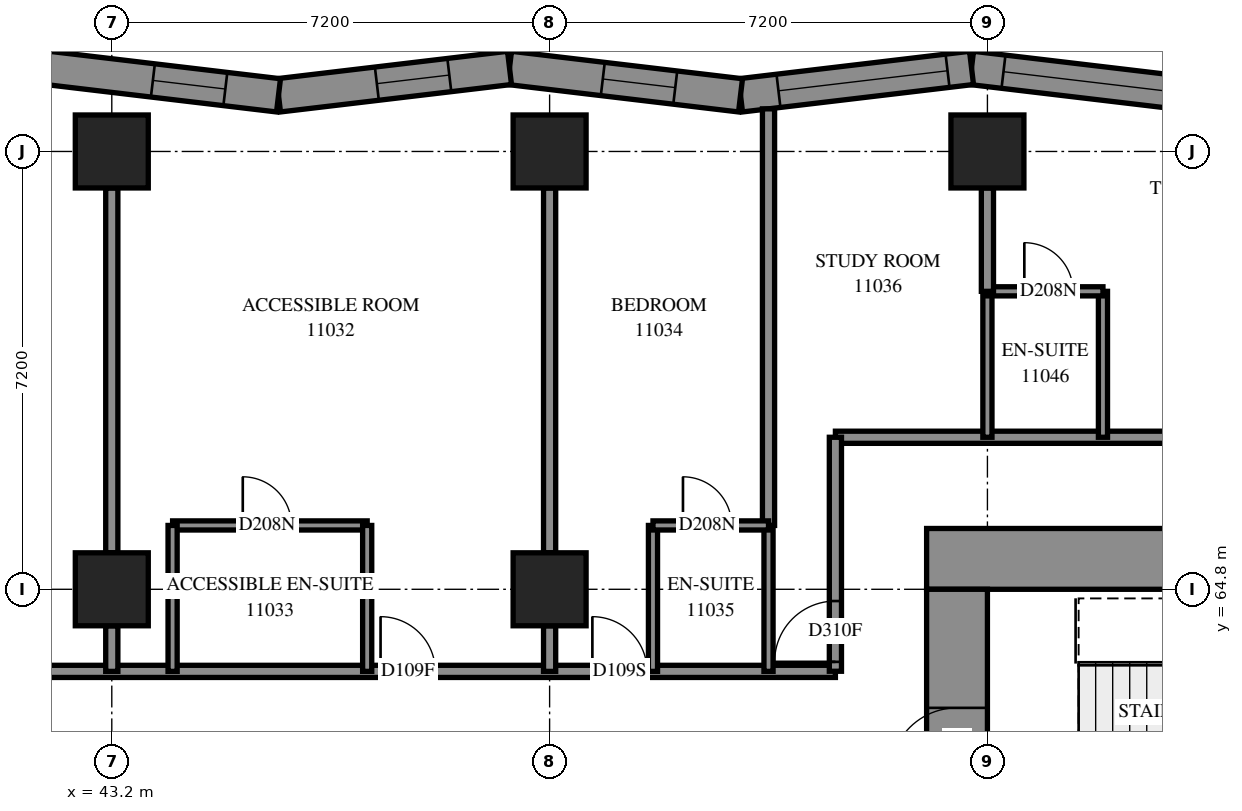
"""IFC4 building model, lengths in metres.
Left out: names, types, materials, properties, quantities, classifications, styles, units other than length and angle.
Written with IfcOpenShell. Run it as: python <this file> out.ifc"""

import sys

from ifc_helpers import new_model, si_unit, direction, frame, frame_2d, origin, origin_2d, place, context, subcontext, project, spatial, polyline, rectangle, outline, extrude, element, fill, save


model = new_model("IFC4")
c1 = context("Model", 3, precision=1e-05, world=origin(), true_north=direction((0.0, 1.0)))
c2 = subcontext(c1, "Body", "Model", "MODEL_VIEW")
j1 = project(units=[si_unit("LENGTHUNIT", "METRE"), si_unit("PLANEANGLEUNIT", "RADIAN")], contexts=[c1])
p1 = place(None, origin())
s1 = spatial("IfcSite", under=j1, at=p1, CompositionType="ELEMENT")
p2 = place(p1, origin())
s2 = spatial("IfcBuilding", under=s1, at=p2, CompositionType="ELEMENT")
p3 = place(p2, frame((0.0, 0.0, 44.0)))
s3 = spatial("IfcBuildingStorey", under=s2, at=p3, CompositionType="ELEMENT", Elevation=44.0)
for number, where, z_axis, x_axis in (
    (1, (43.2, 64.8, 0.0), (0.0, 0.0, 1.0), (1.0, 0.0, 0.0)),
    (2, (43.2, 72.0, 0.0), (0.0, 0.0, 1.0), (1.0, 0.0, 0.0)),
    (3, (50.4, 64.8, 0.0), (0.0, 0.0, 1.0), (1.0, 0.0, 0.0)),
    (4, (50.4, 72.0, 0.0), (0.0, 0.0, 1.0), (1.0, 0.0, 0.0)),
    (5, (57.6, 72.0, 0.0), (0.0, 0.0, 1.0), (1.0, 0.0, 0.0)),
):
    element("IfcColumn", number, at=place(p3, frame(where, z_axis=z_axis, x_axis=x_axis)), inside=s3, PredefinedType="COLUMN", context=c2, shape_type="SweptSolid", body=[
        extrude(rectangle(XDim=1.2, YDim=1.2, at=origin_2d()), origin(), (0.0, 0.0, 1.0), 3.1),
    ])
p4 = place(p3, frame((56.6, 65.3, -0.3), z_axis=(0.0, 0.0, 1.0), x_axis=(1.0, 0.0, 0.0)))
e6 = element("IfcWall", 6, at=p4, inside=s3, PredefinedType="SHEAR", context=c2, shape_type="SweptSolid", body=[
    extrude(rectangle(XDim=16.4, YDim=1.0, at=frame_2d((8.2, 0.0))), origin(), (0.0, 0.0, 1.0), 2.7),
])
p5 = place(p4, frame((11.0, 0.0, 0.3)))
e7 = element("IfcOpeningElement", 7, at=p5, cuts=e6, PredefinedType="OPENING", context=c2, shape_type="SweptSolid", body=[
    extrude(rectangle(XDim=0.8, YDim=2.1, at=frame_2d((0.4, 1.05))), frame((0.0, 0.51, 0.0), z_axis=(0.0, -1.0, 0.0), x_axis=(1.0, 0.0, 0.0)), (0.0, 0.0, 1.0), 1.02),
])
p6 = place(p3, frame((57.1, 50.4, -0.3), z_axis=(0.0, 0.0, 1.0), x_axis=(0.0, 1.0, 0.0)))
e8 = element("IfcWall", 8, at=p6, inside=s3, PredefinedType="SHEAR", context=c2, shape_type="SweptSolid", body=[
    extrude(rectangle(XDim=14.4, YDim=1.0, at=frame_2d((7.2, 0.0))), origin(), (0.0, 0.0, 1.0), 2.7),
])
p7 = place(p6, frame((4.55, 0.0, 0.3)))
e9 = element("IfcOpeningElement", 9, at=p7, cuts=e8, PredefinedType="OPENING", context=c2, shape_type="SweptSolid", body=[
    extrude(rectangle(XDim=1.1, YDim=2.1, at=frame_2d((0.55, 1.05))), frame((0.0, 0.51, 0.0), z_axis=(0.0, -1.0, 0.0), x_axis=(1.0, 0.0, 0.0)), (0.0, 0.0, 1.0), 1.02),
])
p8 = place(p6, frame((11.35, 0.0, 0.3)))
e10 = element("IfcOpeningElement", 10, at=p8, cuts=e8, PredefinedType="OPENING", context=c2, shape_type="SweptSolid", body=[
    extrude(rectangle(XDim=1.1, YDim=2.1, at=frame_2d((0.55, 1.05))), frame((0.0, 0.51, 0.0), z_axis=(0.0, -1.0, 0.0), x_axis=(1.0, 0.0, 0.0)), (0.0, 0.0, 1.0), 1.02),
])
p9 = place(p3, frame((61.138, 72.923, 0.0), z_axis=(0.0, 0.0, 1.0), x_axis=(-0.9930269402, 0.1178876415, 0.0)))
e11 = element("IfcWall", 11, at=p9, inside=s3, PredefinedType="SOLIDWALL", context=c2, shape_type="SweptSolid", body=[
    extrude(outline(polyline([(0.033, -0.275), (3.858, -0.275), (3.793, 0.275), (-0.033, 0.275), (0.033, -0.275)])), origin(), (0.0, 0.0, 1.0), 3.1),
])
p10 = place(p9, frame((0.496, 0.0, 0.5)))
e12 = element("IfcOpeningElement", 12, at=p10, cuts=e11, PredefinedType="OPENING", context=c2, shape_type="SweptSolid", body=[
    extrude(rectangle(XDim=2.8, YDim=2.45, at=frame_2d((1.4, 1.225))), frame((0.0, 0.285, 0.0), z_axis=(0.0, -1.0, 0.0), x_axis=(1.0, 0.0, 0.0)), (0.0, 0.0, 1.0), 0.57),
])
p11 = place(p3, frame((57.339, 73.374, 0.0), z_axis=(0.0, 0.0, 1.0), x_axis=(-0.9930265769, -0.1178907016, 0.0)))
e13 = element("IfcWall", 13, at=p11, inside=s3, PredefinedType="SOLIDWALL", context=c2, shape_type="SweptSolid", body=[
    extrude(outline(polyline([(-0.033, -0.275), (3.793, -0.275), (3.858, 0.275), (0.033, 0.275), (-0.033, -0.275)])), origin(), (0.0, 0.0, 1.0), 3.1),
])
p12 = place(p11, frame((0.397, 0.0, 0.5)))
e14 = element("IfcOpeningElement", 14, at=p12, cuts=e13, PredefinedType="OPENING", context=c2, shape_type="SweptSolid", body=[
    extrude(rectangle(XDim=2.8, YDim=2.45, at=frame_2d((1.4, 1.225))), frame((0.0, 0.285, 0.0), z_axis=(0.0, -1.0, 0.0), x_axis=(1.0, 0.0, 0.0)), (0.0, 0.0, 1.0), 0.57),
])
p13 = place(p3, frame((53.54, 72.923, 0.0), z_axis=(0.0, 0.0, 1.0), x_axis=(-0.9930269402, 0.1178876415, 0.0)))
e15 = element("IfcWall", 15, at=p13, inside=s3, PredefinedType="SOLIDWALL", context=c2, shape_type="SweptSolid", body=[
    extrude(outline(polyline([(0.033, -0.275), (3.858, -0.275), (3.793, 0.275), (-0.033, 0.275), (0.033, -0.275)])), origin(), (0.0, 0.0, 1.0), 3.1),
])
p14 = place(p13, frame((1.081, 0.0, 0.5)))
e16 = element("IfcOpeningElement", 16, at=p14, cuts=e15, PredefinedType="OPENING", context=c2, shape_type="SweptSolid", body=[
    extrude(rectangle(XDim=1.2, YDim=2.45, at=frame_2d((0.6, 1.225))), frame((0.0, 0.285, 0.0), z_axis=(0.0, -1.0, 0.0), x_axis=(1.0, 0.0, 0.0)), (0.0, 0.0, 1.0), 0.57),
])
p15 = place(p3, frame((49.741, 73.374, 0.0), z_axis=(0.0, 0.0, 1.0), x_axis=(-0.9930265769, -0.1178907016, 0.0)))
e17 = element("IfcWall", 17, at=p15, inside=s3, PredefinedType="SOLIDWALL", context=c2, shape_type="SweptSolid", body=[
    extrude(outline(polyline([(-0.033, -0.275), (3.793, -0.275), (3.858, 0.275), (0.033, 0.275), (-0.033, -0.275)])), origin(), (0.0, 0.0, 1.0), 3.1),
])
p16 = place(p15, frame((0.997, 0.0, 0.5)))
e18 = element("IfcOpeningElement", 18, at=p16, cuts=e17, PredefinedType="OPENING", context=c2, shape_type="SweptSolid", body=[
    extrude(rectangle(XDim=1.2, YDim=2.45, at=frame_2d((0.6, 1.225))), frame((0.0, 0.285, 0.0), z_axis=(0.0, -1.0, 0.0), x_axis=(1.0, 0.0, 0.0)), (0.0, 0.0, 1.0), 0.57),
])
p17 = place(p3, frame((45.942, 72.923, 0.0), z_axis=(0.0, 0.0, 1.0), x_axis=(-0.9930269402, 0.1178876415, 0.0)))
e19 = element("IfcWall", 19, at=p17, inside=s3, PredefinedType="SOLIDWALL", context=c2, shape_type="SweptSolid", body=[
    extrude(outline(polyline([(0.033, -0.275), (3.858, -0.275), (3.793, 0.275), (-0.033, 0.275), (0.033, -0.275)])), origin(), (0.0, 0.0, 1.0), 3.1),
])
p18 = place(p17, frame((0.88, 0.0, 0.5)))
e20 = element("IfcOpeningElement", 20, at=p18, cuts=e19, PredefinedType="OPENING", context=c2, shape_type="SweptSolid", body=[
    extrude(rectangle(XDim=1.2, YDim=2.45, at=frame_2d((0.6, 1.225))), frame((0.0, 0.285, 0.0), z_axis=(0.0, -1.0, 0.0), x_axis=(1.0, 0.0, 0.0)), (0.0, 0.0, 1.0), 0.57),
])
p19 = place(p3, frame((33.452, 63.45, 0.0), z_axis=(0.0, 0.0, 1.0), x_axis=(1.0, 0.0, 0.0)))
e21 = element("IfcWall", 21, at=p19, inside=s3, PredefinedType="PARTITIONING", context=c2, shape_type="SweptSolid", body=[
    extrude(rectangle(XDim=21.648, YDim=0.2, at=frame_2d((10.824, 0.0))), origin(), (0.0, 0.0, 1.0), 3.1),
])
p20 = place(p19, frame((0.142, 0.0, 0.0)))
e22 = element("IfcOpeningElement", 22, at=p20, cuts=e21, PredefinedType="OPENING", context=c2, shape_type="SweptSolid", body=[
    extrude(rectangle(XDim=1.0, YDim=2.1, at=frame_2d((0.5, 1.05))), frame((0.0, 0.11, 0.0), z_axis=(0.0, -1.0, 0.0), x_axis=(1.0, 0.0, 0.0)), (0.0, 0.0, 1.0), 0.22),
])
p21 = place(p19, frame((6.412, 0.0, 0.0)))
e23 = element("IfcOpeningElement", 23, at=p21, cuts=e21, PredefinedType="OPENING", context=c2, shape_type="SweptSolid", body=[
    extrude(rectangle(XDim=0.9, YDim=2.1, at=frame_2d((0.45, 1.05))), frame((0.0, 0.11, 0.0), z_axis=(0.0, -1.0, 0.0), x_axis=(1.0, 0.0, 0.0)), (0.0, 0.0, 1.0), 0.22),
])
p22 = place(p19, frame((14.168, 0.0, 0.0)))
e24 = element("IfcOpeningElement", 24, at=p22, cuts=e21, PredefinedType="OPENING", context=c2, shape_type="SweptSolid", body=[
    extrude(rectangle(XDim=0.9, YDim=2.1, at=frame_2d((0.45, 1.05))), frame((0.0, 0.11, 0.0), z_axis=(0.0, -1.0, 0.0), x_axis=(1.0, 0.0, 0.0)), (0.0, 0.0, 1.0), 0.22),
])
p23 = place(p19, frame((17.651, 0.0, 0.0)))
e25 = element("IfcOpeningElement", 25, at=p23, cuts=e21, PredefinedType="OPENING", context=c2, shape_type="SweptSolid", body=[
    extrude(rectangle(XDim=0.9, YDim=2.1, at=frame_2d((0.45, 1.05))), frame((0.0, 0.11, 0.0), z_axis=(0.0, -1.0, 0.0), x_axis=(1.0, 0.0, 0.0)), (0.0, 0.0, 1.0), 0.22),
])
p24 = place(p3, frame((55.1, 67.3, 0.0), z_axis=(0.0, 0.0, 1.0), x_axis=(1.0, 0.0, 0.0)))
e26 = element("IfcWall", 26, at=p24, inside=s3, PredefinedType="PARTITIONING", context=c2, shape_type="SweptSolid", body=[
    extrude(rectangle(XDim=19.4, YDim=0.2, at=frame_2d((9.7, 0.0))), origin(), (0.0, 0.0, 1.0), 3.1),
])
p25 = place(p24, frame((6.399, 0.0, 0.0)))
e27 = element("IfcOpeningElement", 27, at=p25, cuts=e26, PredefinedType="OPENING", context=c2, shape_type="SweptSolid", body=[
    extrude(rectangle(XDim=0.9, YDim=2.1, at=frame_2d((0.45, 1.05))), frame((0.0, 0.11, 0.0), z_axis=(0.0, -1.0, 0.0), x_axis=(1.0, 0.0, 0.0)), (0.0, 0.0, 1.0), 0.22),
])
p26 = place(p24, frame((13.599, 0.0, 0.0)))
e28 = element("IfcOpeningElement", 28, at=p26, cuts=e26, PredefinedType="OPENING", context=c2, shape_type="SweptSolid", body=[
    extrude(rectangle(XDim=0.9, YDim=2.1, at=frame_2d((0.45, 1.05))), frame((0.0, 0.11, 0.0), z_axis=(0.0, -1.0, 0.0), x_axis=(1.0, 0.0, 0.0)), (0.0, 0.0, 1.0), 0.22),
])
p27 = place(p3, frame((54.0, 65.85, 0.0), z_axis=(0.0, 0.0, 1.0), x_axis=(0.0, 1.0, 0.0)))
e29 = element("IfcWall", 29, at=p27, inside=s3, PredefinedType="PARTITIONING", context=c2, shape_type="SweptSolid", body=[
    extrude(rectangle(XDim=6.851, YDim=0.2, at=frame_2d((3.425, 0.0))), origin(), (0.0, 0.0, 1.0), 3.1),
])
for number, where, z_axis, x_axis in (
    (30, (43.2, 65.4, 0.0), (0.0, 0.0, 1.0), (0.0, 1.0, 0.0)),
    (31, (50.4, 65.4, 0.0), (0.0, 0.0, 1.0), (0.0, 1.0, 0.0)),
):
    element("IfcWall", number, at=place(p3, frame(where, z_axis=z_axis, x_axis=x_axis)), inside=s3, PredefinedType="PARTITIONING", context=c2, shape_type="SweptSolid", body=[
        extrude(rectangle(XDim=6.0, YDim=0.2, at=frame_2d((3.0, 0.0))), origin(), (0.0, 0.0, 1.0), 3.1),
    ])
p28 = place(p3, frame((55.1, 63.452, 0.0), z_axis=(0.0, 0.0, 1.0), x_axis=(0.0, 1.0, 0.0)))
e32 = element("IfcWall", 32, at=p28, inside=s3, PredefinedType="PARTITIONING", context=c2, shape_type="SweptSolid", body=[
    extrude(rectangle(XDim=3.848, YDim=0.2, at=frame_2d((1.924, 0.0))), origin(), (0.0, 0.0, 1.0), 3.1),
])
p29 = place(p28, frame((0.155, 0.0, 0.0)))
e33 = element("IfcOpeningElement", 33, at=p29, cuts=e32, PredefinedType="OPENING", context=c2, shape_type="SweptSolid", body=[
    extrude(rectangle(XDim=1.0, YDim=2.1, at=frame_2d((0.5, 1.05))), frame((0.0, 0.11, 0.0), z_axis=(0.0, -1.0, 0.0), x_axis=(1.0, 0.0, 0.0)), (0.0, 0.0, 1.0), 0.22),
])
p30 = place(p3, frame((44.2, 65.85, 0.0), z_axis=(0.0, 0.0, 1.0), x_axis=(1.0, 0.0, 0.0)))
e34 = element("IfcWall", 34, at=p30, inside=s3, PredefinedType="PARTITIONING", context=c2, shape_type="SweptSolid", body=[
    extrude(rectangle(XDim=3.2, YDim=0.15, at=frame_2d((1.6, 0.0))), origin(), (0.0, 0.0, 1.0), 3.1),
])
p31 = place(p30, frame((1.154, 0.0, 0.0)))
e35 = element("IfcOpeningElement", 35, at=p31, cuts=e34, PredefinedType="OPENING", context=c2, shape_type="SweptSolid", body=[
    extrude(rectangle(XDim=0.8, YDim=2.1, at=frame_2d((0.4, 1.05))), frame((0.0, 0.085, 0.0), z_axis=(0.0, -1.0, 0.0), x_axis=(1.0, 0.0, 0.0)), (0.0, 0.0, 1.0), 0.17),
])
for number, where, z_axis, x_axis in (
    (36, (59.5, 67.3, 0.0), (0.0, 0.0, 1.0), (0.0, 1.0, 0.0)),
    (37, (57.6, 67.3, 0.0), (0.0, 0.0, 1.0), (0.0, 1.0, 0.0)),
    (38, (44.2, 63.45, 0.0), (0.0, 0.0, 1.0), (0.0, 1.0, 0.0)),
    (39, (47.4, 63.45, 0.0), (0.0, 0.0, 1.0), (0.0, 1.0, 0.0)),
    (40, (52.1, 63.45, 0.0), (0.0, 0.0, 1.0), (0.0, 1.0, 0.0)),
    (41, (54.0, 63.45, 0.0), (0.0, 0.0, 1.0), (0.0, 1.0, 0.0)),
):
    element("IfcWall", number, at=place(p3, frame(where, z_axis=z_axis, x_axis=x_axis)), inside=s3, PredefinedType="PARTITIONING", context=c2, shape_type="SweptSolid", body=[
        extrude(rectangle(XDim=2.4, YDim=0.15, at=frame_2d((1.2, 0.0))), origin(), (0.0, 0.0, 1.0), 3.1),
    ])
p32 = place(p3, frame((52.1, 65.85, 0.0), z_axis=(0.0, 0.0, 1.0), x_axis=(1.0, 0.0, 0.0)))
e42 = element("IfcWall", 42, at=p32, inside=s3, PredefinedType="PARTITIONING", context=c2, shape_type="SweptSolid", body=[
    extrude(rectangle(XDim=1.9, YDim=0.15, at=frame_2d((0.95, 0.0))), origin(), (0.0, 0.0, 1.0), 3.1),
])
p33 = place(p32, frame((0.493, 0.0, 0.0)))
e43 = element("IfcOpeningElement", 43, at=p33, cuts=e42, PredefinedType="OPENING", context=c2, shape_type="SweptSolid", body=[
    extrude(rectangle(XDim=0.8, YDim=2.1, at=frame_2d((0.4, 1.05))), frame((0.0, 0.085, 0.0), z_axis=(0.0, -1.0, 0.0), x_axis=(1.0, 0.0, 0.0)), (0.0, 0.0, 1.0), 0.17),
])
p34 = place(p3, frame((57.6, 69.7, 0.0), z_axis=(0.0, 0.0, 1.0), x_axis=(1.0, 0.0, 0.0)))
e44 = element("IfcWall", 44, at=p34, inside=s3, PredefinedType="PARTITIONING", context=c2, shape_type="SweptSolid", body=[
    extrude(rectangle(XDim=1.9, YDim=0.15, at=frame_2d((0.95, 0.0))), origin(), (0.0, 0.0, 1.0), 3.1),
])
p35 = place(p34, frame((0.607, 0.0, 0.0)))
e45 = element("IfcOpeningElement", 45, at=p35, cuts=e44, PredefinedType="OPENING", context=c2, shape_type="SweptSolid", body=[
    extrude(rectangle(XDim=0.8, YDim=2.1, at=frame_2d((0.4, 1.05))), frame((0.0, 0.085, 0.0), z_axis=(0.0, -1.0, 0.0), x_axis=(1.0, 0.0, 0.0)), (0.0, 0.0, 1.0), 0.17),
])
p36 = place(p3, frame((57.6, 69.7, 0.0), z_axis=(0.0, 0.0, 1.0), x_axis=(0.0, 1.0, 0.0)))
e46 = element("IfcWall", 46, at=p36, inside=s3, PredefinedType="PARTITIONING", context=c2, shape_type="SweptSolid", body=[
    extrude(rectangle(XDim=1.7, YDim=0.2, at=frame_2d((0.85, 0.0))), origin(), (0.0, 0.0, 1.0), 3.1),
])
for number, where, z_axis, x_axis in (
    (47, (43.2, 63.45, 0.0), (0.0, 0.0, 1.0), (0.0, 1.0, 0.0)),
    (48, (50.4, 63.45, 0.0), (0.0, 0.0, 1.0), (0.0, 1.0, 0.0)),
):
    element("IfcWall", number, at=place(p3, frame(where, z_axis=z_axis, x_axis=x_axis)), inside=s3, PredefinedType="PARTITIONING", context=c2, shape_type="SweptSolid", body=[
        extrude(rectangle(XDim=0.75, YDim=0.2, at=frame_2d((0.375, 0.0))), origin(), (0.0, 0.0, 1.0), 3.1),
    ])
p37 = place(p10, origin())
e49 = element("IfcWindow", 49, at=p37, inside=s3, PartitioningType="SINGLE_PANEL", PredefinedType="WINDOW", context=c2, shape_type="SweptSolid", body=[
    extrude(rectangle(XDim=2.8, YDim=2.45, at=frame_2d((1.4, 1.225))), frame((0.0, 0.155, 0.0), z_axis=(0.0, -1.0, 0.0), x_axis=(1.0, 0.0, 0.0)), (0.0, 0.0, 1.0), 0.06),
])
fill(e12, e49)
p38 = place(p12, origin())
e50 = element("IfcWindow", 50, at=p38, inside=s3, PartitioningType="SINGLE_PANEL", PredefinedType="WINDOW", context=c2, shape_type="SweptSolid", body=[
    extrude(rectangle(XDim=2.8, YDim=2.45, at=frame_2d((1.4, 1.225))), frame((0.0, 0.155, 0.0), z_axis=(0.0, -1.0, 0.0), x_axis=(1.0, 0.0, 0.0)), (0.0, 0.0, 1.0), 0.06),
])
fill(e14, e50)
p39 = place(p14, origin())
e51 = element("IfcWindow", 51, at=p39, inside=s3, PartitioningType="SINGLE_PANEL", PredefinedType="WINDOW", context=c2, shape_type="SweptSolid", body=[
    extrude(rectangle(XDim=1.2, YDim=2.45, at=frame_2d((0.6, 1.225))), frame((0.0, 0.155, 0.0), z_axis=(0.0, -1.0, 0.0), x_axis=(1.0, 0.0, 0.0)), (0.0, 0.0, 1.0), 0.06),
])
fill(e16, e51)
p40 = place(p16, origin())
e52 = element("IfcWindow", 52, at=p40, inside=s3, PartitioningType="SINGLE_PANEL", PredefinedType="WINDOW", context=c2, shape_type="SweptSolid", body=[
    extrude(rectangle(XDim=1.2, YDim=2.45, at=frame_2d((0.6, 1.225))), frame((0.0, 0.155, 0.0), z_axis=(0.0, -1.0, 0.0), x_axis=(1.0, 0.0, 0.0)), (0.0, 0.0, 1.0), 0.06),
])
fill(e18, e52)
p41 = place(p18, origin())
e53 = element("IfcWindow", 53, at=p41, inside=s3, PartitioningType="SINGLE_PANEL", PredefinedType="WINDOW", context=c2, shape_type="SweptSolid", body=[
    extrude(rectangle(XDim=1.2, YDim=2.45, at=frame_2d((0.6, 1.225))), frame((0.0, 0.155, 0.0), z_axis=(0.0, -1.0, 0.0), x_axis=(1.0, 0.0, 0.0)), (0.0, 0.0, 1.0), 0.06),
])
fill(e20, e53)
p42 = place(p8, origin())
e54 = element("IfcDoor", 54, at=p42, inside=s3, OperationType="SINGLE_SWING_LEFT", PredefinedType="DOOR", context=c2, shape_type="SweptSolid", body=[
    extrude(rectangle(XDim=1.1, YDim=2.1, at=frame_2d((0.55, 1.05))), frame((0.0, 0.025, 0.0), z_axis=(0.0, -1.0, 0.0), x_axis=(1.0, 0.0, 0.0)), (0.0, 0.0, 1.0), 0.05),
])
fill(e10, e54)
p43 = place(p22, origin())
e55 = element("IfcDoor", 55, at=p43, inside=s3, OperationType="SINGLE_SWING_RIGHT", PredefinedType="DOOR", context=c2, shape_type="SweptSolid", body=[
    extrude(rectangle(XDim=0.9, YDim=2.1, at=frame_2d((0.45, 1.05))), frame((0.0, 0.025, 0.0), z_axis=(0.0, -1.0, 0.0), x_axis=(1.0, 0.0, 0.0)), (0.0, 0.0, 1.0), 0.05),
])
fill(e24, e55)
p44 = place(p31, origin())
e56 = element("IfcDoor", 56, at=p44, inside=s3, OperationType="SINGLE_SWING_RIGHT", PredefinedType="DOOR", context=c2, shape_type="SweptSolid", body=[
    extrude(rectangle(XDim=0.8, YDim=2.1, at=frame_2d((0.4, 1.05))), frame((0.0, 0.025, 0.0), z_axis=(0.0, -1.0, 0.0), x_axis=(1.0, 0.0, 0.0)), (0.0, 0.0, 1.0), 0.05),
])
fill(e35, e56)
p45 = place(p23, origin())
e57 = element("IfcDoor", 57, at=p45, inside=s3, OperationType="SINGLE_SWING_RIGHT", PredefinedType="DOOR", context=c2, shape_type="SweptSolid", body=[
    extrude(rectangle(XDim=0.9, YDim=2.1, at=frame_2d((0.45, 1.05))), frame((0.0, 0.025, 0.0), z_axis=(0.0, -1.0, 0.0), x_axis=(1.0, 0.0, 0.0)), (0.0, 0.0, 1.0), 0.05),
])
fill(e25, e57)
p46 = place(p33, origin())
e58 = element("IfcDoor", 58, at=p46, inside=s3, OperationType="SINGLE_SWING_RIGHT", PredefinedType="DOOR", context=c2, shape_type="SweptSolid", body=[
    extrude(rectangle(XDim=0.8, YDim=2.1, at=frame_2d((0.4, 1.05))), frame((0.0, 0.025, 0.0), z_axis=(0.0, -1.0, 0.0), x_axis=(1.0, 0.0, 0.0)), (0.0, 0.0, 1.0), 0.05),
])
fill(e43, e58)
p47 = place(p29, origin())
e59 = element("IfcDoor", 59, at=p47, inside=s3, OperationType="SINGLE_SWING_LEFT", PredefinedType="DOOR", context=c2, shape_type="SweptSolid", body=[
    extrude(rectangle(XDim=1.0, YDim=2.1, at=frame_2d((0.5, 1.05))), frame((0.0, 0.025, 0.0), z_axis=(0.0, -1.0, 0.0), x_axis=(1.0, 0.0, 0.0)), (0.0, 0.0, 1.0), 0.05),
])
fill(e33, e59)
p48 = place(p35, origin())
e60 = element("IfcDoor", 60, at=p48, inside=s3, OperationType="SINGLE_SWING_RIGHT", PredefinedType="DOOR", context=c2, shape_type="SweptSolid", body=[
    extrude(rectangle(XDim=0.8, YDim=2.1, at=frame_2d((0.4, 1.05))), frame((0.0, 0.025, 0.0), z_axis=(0.0, -1.0, 0.0), x_axis=(1.0, 0.0, 0.0)), (0.0, 0.0, 1.0), 0.05),
])
fill(e45, e60)
save(model, sys.argv[1])
